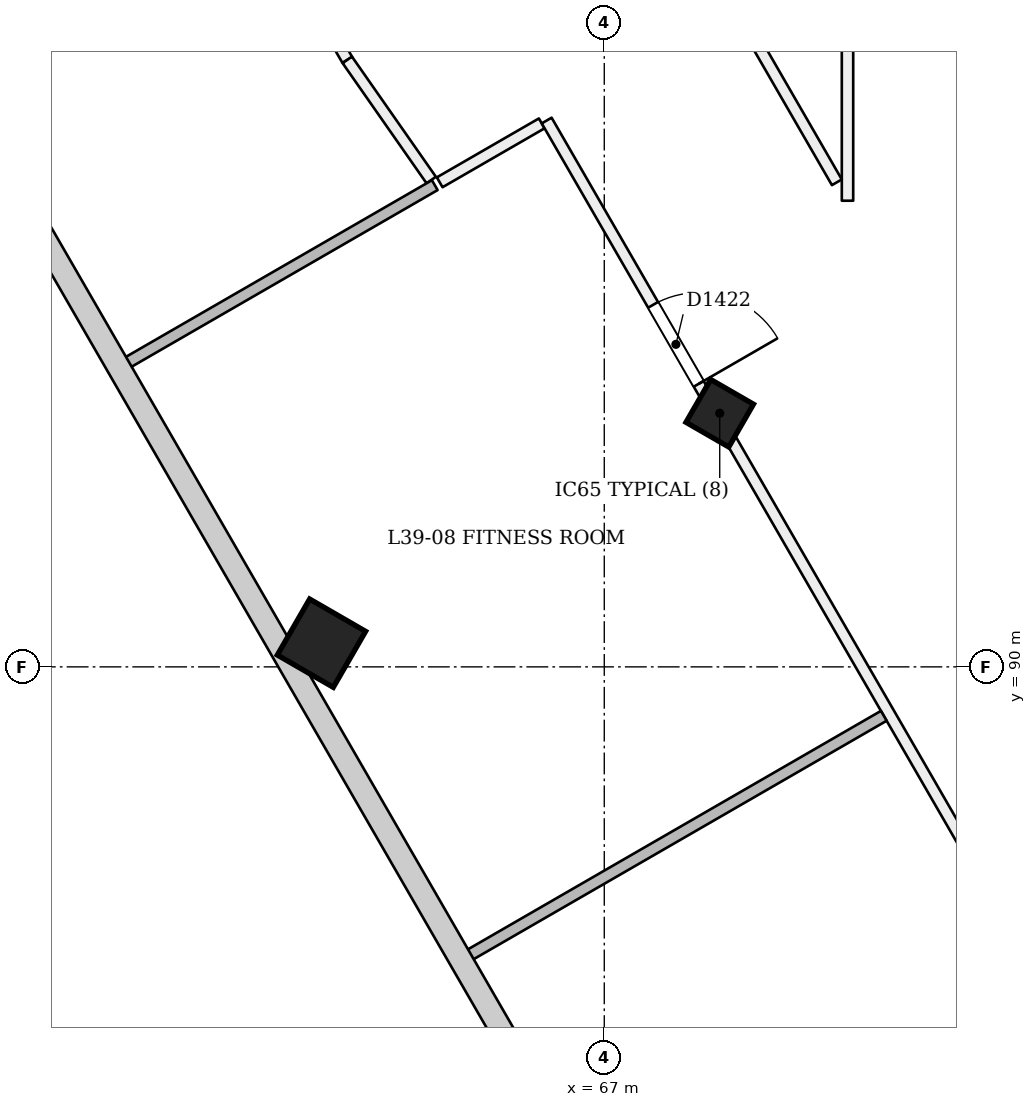
"""IFC4 building model, lengths in metres.
Left out: names, types, materials, properties, quantities, classifications, styles, units other than length and angle.
Written with IfcOpenShell. Run it as: python <this file> out.ifc"""

import sys

from ifc_helpers import new_model, si_unit, direction, frame, frame_2d, origin, origin_2d, place, context, subcontext, project, spatial, rectangle, extrude, element, fill, save


model = new_model("IFC4")
c1 = context("Model", 3, precision=1e-05, world=origin(), true_north=direction((0.0, 1.0)))
c2 = subcontext(c1, "Body", "Model", "MODEL_VIEW")
j1 = project(units=[si_unit("LENGTHUNIT", "METRE"), si_unit("PLANEANGLEUNIT", "RADIAN")], contexts=[c1])
p1 = place(None, origin())
s1 = spatial("IfcSite", under=j1, at=p1, CompositionType="ELEMENT")
p2 = place(p1, origin())
s2 = spatial("IfcBuilding", under=s1, at=p2, CompositionType="ELEMENT")
p3 = place(p2, frame((0.0, 0.0, 153.0)))
s3 = spatial("IfcBuildingStorey", under=s2, at=p3, CompositionType="ELEMENT", Elevation=153.0)
p4 = place(p3, frame((68.492, 93.29, -0.02), z_axis=(0.02215369191, 0.038413282303, 0.999016333038), x_axis=(-0.86535929663, -0.499678396489, 0.038402966283)))
e1 = element("IfcColumn", 1, at=p4, inside=s3, PredefinedType="COLUMN", context=c2, shape_type="SweptSolid", body=[
    extrude(rectangle(XDim=0.65, YDim=0.65, at=origin_2d()), origin(), (0.0, 0.0, 1.0), 3.604),
])
p5 = place(p3, frame((63.252, 90.264, -0.026), z_axis=(0.02222134892, 0.038480872521, 0.999012229206), x_axis=(-0.865639401317, -0.499186837261, 0.038482832442)))
e2 = element("IfcColumn", 2, at=p5, inside=s3, PredefinedType="COLUMN", context=c2, shape_type="SweptSolid", body=[
    extrude(rectangle(XDim=0.85, YDim=0.85, at=origin_2d()), origin(), (0.0, 0.0, 1.0), 3.604),
])
p6 = place(p3, frame((64.835, 96.375, 0.0), z_axis=(0.0, 0.0, 1.0), x_axis=(0.86601511528, 0.500017819788, 0.0)))
e3 = element("IfcWall", 3, at=p6, inside=s3, PredefinedType="PARTITIONING", context=c2, shape_type="SweptSolid", body=[
    extrude(rectangle(XDim=1.55, YDim=0.15, at=frame_2d((0.775, 0.0))), origin(), (0.0, 0.0, 1.0), 3.15),
])
p7 = place(p3, frame((66.242, 97.188, 0.0), z_axis=(0.0, 0.0, 1.0), x_axis=(0.500002614046, -0.866023894559, 0.0)))
e4 = element("IfcWall", 4, at=p7, inside=s3, PredefinedType="PARTITIONING", context=c2, shape_type="SweptSolid", body=[
    extrude(rectangle(XDim=37.515, YDim=0.15, at=frame_2d((18.758, 0.0))), origin(), (0.0, 0.0, 1.0), 2.75),
])
p8 = place(p7, frame((2.8, 0.0, 0.0)))
e5 = element("IfcOpeningElement", 5, at=p8, cuts=e4, PredefinedType="OPENING", context=c2, shape_type="SweptSolid", body=[
    extrude(rectangle(XDim=1.2, YDim=2.1, at=frame_2d((0.6, 1.05))), frame((0.0, 0.085, 0.0), z_axis=(0.0, -1.0, 0.0), x_axis=(1.0, 0.0, 0.0)), (0.0, 0.0, 1.0), 0.171),
])
p9 = place(p7, frame((11.8, 0.0, 0.0)))
e6 = element("IfcOpeningElement", 6, at=p9, cuts=e4, PredefinedType="OPENING", context=c2, shape_type="SweptSolid", body=[
    extrude(rectangle(XDim=1.2, YDim=2.1, at=frame_2d((0.6, 1.05))), frame((0.0, 0.085, 0.0), z_axis=(0.0, -1.0, 0.0), x_axis=(1.0, 0.0, 0.0)), (0.0, 0.0, 1.0), 0.171),
])
p10 = place(p7, frame((24.15, 0.0, 0.0)))
e7 = element("IfcOpeningElement", 7, at=p10, cuts=e4, PredefinedType="OPENING", context=c2, shape_type="SweptSolid", body=[
    extrude(rectangle(XDim=1.2, YDim=2.1, at=frame_2d((0.6, 1.05))), frame((0.0, 0.085, 0.0), z_axis=(0.0, -1.0, 0.0), x_axis=(1.0, 0.0, 0.0)), (0.0, 0.0, 1.0), 0.171),
])
p11 = place(p7, frame((33.25, 0.0, 0.0)))
e8 = element("IfcOpeningElement", 8, at=p11, cuts=e4, PredefinedType="OPENING", context=c2, shape_type="SweptSolid", body=[
    extrude(rectangle(XDim=1.0, YDim=2.1, at=frame_2d((0.5, 1.05))), frame((0.0, 0.085, 0.0), z_axis=(0.0, -1.0, 0.0), x_axis=(1.0, 0.0, 0.0)), (0.0, 0.0, 1.0), 0.171),
])
p12 = place(p3, frame((70.2, 101.4, 0.0), z_axis=(0.0, 0.0, 1.0), x_axis=(0.0, -1.0, 0.0)))
e9 = element("IfcWall", 9, at=p12, inside=s3, PredefinedType="PARTITIONING", context=c2, shape_type="SweptSolid", body=[
    extrude(rectangle(XDim=5.267, YDim=0.15, at=frame_2d((2.634, 0.0))), origin(), (0.0, 0.0, 1.0), 3.15),
])
p13 = place(p12, frame((0.283, 0.0, 0.0)))
e10 = element("IfcOpeningElement", 10, at=p13, cuts=e9, PredefinedType="OPENING", context=c2, shape_type="SweptSolid", body=[
    extrude(rectangle(XDim=1.2, YDim=2.1, at=frame_2d((0.6, 1.05))), frame((0.0, 0.085, 0.0), z_axis=(0.0, -1.0, 0.0), x_axis=(1.0, 0.0, 0.0)), (0.0, 0.0, 1.0), 0.171),
])
p14 = place(p3, frame((70.06, 96.375, 0.0), z_axis=(0.0, 0.0, 1.0), x_axis=(-0.500003931296, 0.866023134038, 0.0)))
e11 = element("IfcWall", 11, at=p14, inside=s3, PredefinedType="PARTITIONING", context=c2, shape_type="SweptSolid", body=[
    extrude(rectangle(XDim=4.905, YDim=0.15, at=frame_2d((2.453, 0.0))), origin(), (0.0, 0.0, 1.0), 3.15),
])
p15 = place(p3, frame((62.385, 100.122, 0.0), z_axis=(0.0, 0.0, 1.0), x_axis=(0.499959415009, -0.866048834272, 0.0)))
e12 = element("IfcWall", 12, at=p15, inside=s3, PredefinedType="PARTITIONING", context=c2, shape_type="SweptSolid", body=[
    extrude(rectangle(XDim=2.468, YDim=0.15, at=frame_2d((1.234, 0.0))), origin(), (0.0, 0.0, 1.0), 3.15),
])
p16 = place(p3, frame((63.619, 97.985, 0.0), z_axis=(0.0, 0.0, 1.0), x_axis=(0.572569724847, -0.81985603016, 0.0)))
e13 = element("IfcWall", 13, at=p16, inside=s3, PredefinedType="PARTITIONING", context=c2, shape_type="SweptSolid", body=[
    extrude(rectangle(XDim=1.928, YDim=0.15, at=frame_2d((0.964, 0.0))), origin(), (0.0, 0.0, 1.0), 3.15),
])
p17 = place(p3, frame((65.2, 86.193, 0.0), z_axis=(0.0, 0.0, 1.0), x_axis=(0.866015887322, 0.500016482634, 0.0)))
e14 = element("IfcWall", 14, at=p17, inside=s3, PredefinedType="PARTITIONING", context=c2, shape_type="SweptSolid", body=[
    extrude(rectangle(XDim=6.325, YDim=0.15, at=frame_2d((3.163, 0.0))), origin(), (0.0, 0.0, 1.0), 2.65),
])
p18 = place(p3, frame((64.77, 96.338, 0.0), z_axis=(0.0, 0.0, 1.0), x_axis=(-0.866016039709, -0.500016218704, 0.0)))
e15 = element("IfcWall", 15, at=p18, inside=s3, PredefinedType="PARTITIONING", context=c2, shape_type="SweptSolid", body=[
    extrude(rectangle(XDim=4.7, YDim=0.15, at=frame_2d((2.35, 0.0))), origin(), (0.0, 0.0, 1.0), 2.65),
])
p19 = place(p8, origin())
e16 = element("IfcDoor", 16, at=p19, inside=s3, OperationType="SINGLE_SWING_RIGHT", PredefinedType="NOTDEFINED", context=c2, shape_type="SweptSolid", body=[
    extrude(rectangle(XDim=1.2, YDim=2.1, at=frame_2d((0.6, 1.05))), frame((0.0, 0.025, 0.0), z_axis=(0.0, -1.0, 0.0), x_axis=(1.0, 0.0, 0.0)), (0.0, 0.0, 1.0), 0.05),
])
fill(e5, e16)
save(model, sys.argv[1])
